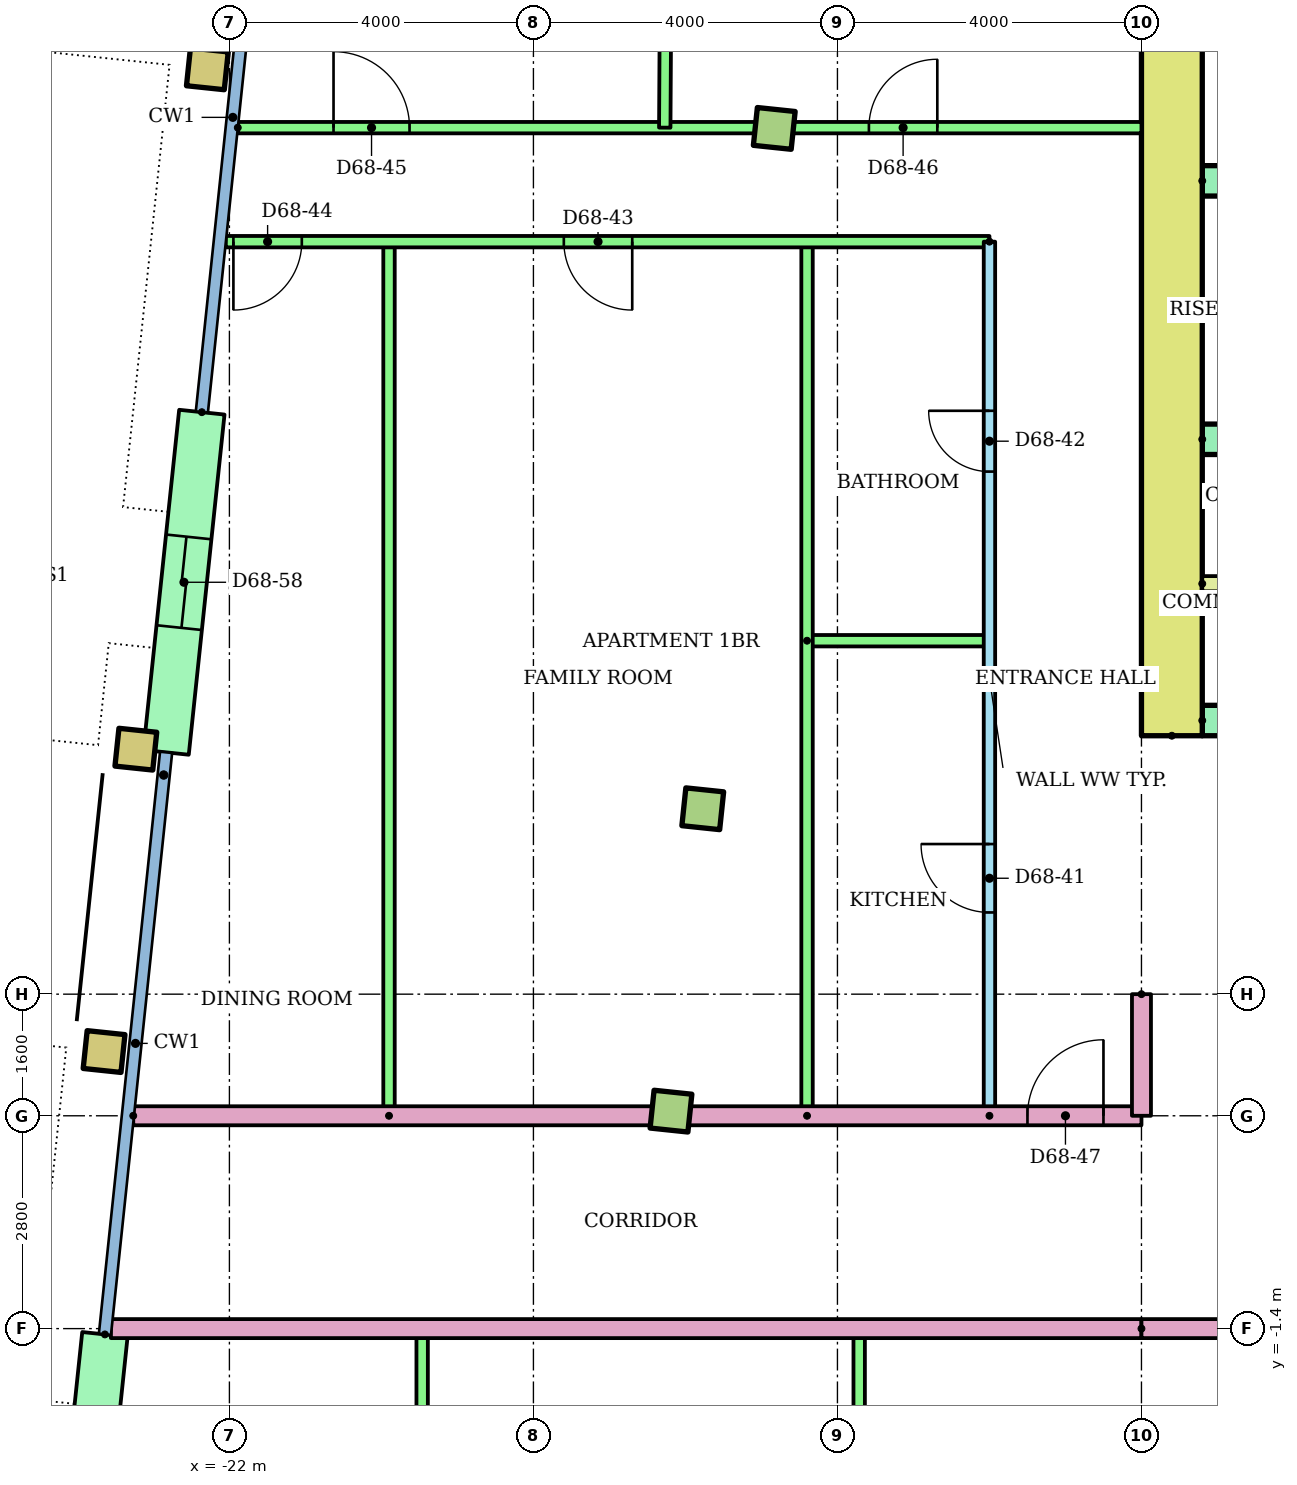
"""IFC4 building model, lengths in metres.
Left out: names, types, materials, properties, quantities, classifications, styles, units other than length and angle.
Written with IfcOpenShell. Run it as: python <this file> out.ifc"""

import sys

from ifc_helpers import new_model, si_unit, direction, frame, frame_2d, origin, origin_2d, place, context, subcontext, project, spatial, rectangle, hollow_rectangle, extrude, element, fill, save


model = new_model("IFC4")
c1 = context("Model", 3, precision=1e-05, world=origin(), true_north=direction((0.0, 1.0)))
c2 = subcontext(c1, "Body", "Model", "MODEL_VIEW")
j1 = project(units=[si_unit("LENGTHUNIT", "METRE"), si_unit("PLANEANGLEUNIT", "RADIAN")], contexts=[c1])
p1 = place(None, origin())
s1 = spatial("IfcSite", under=j1, at=p1, CompositionType="ELEMENT")
p2 = place(p1, origin())
s2 = spatial("IfcBuilding", under=s1, at=p2, CompositionType="ELEMENT")
p3 = place(p2, frame((0.0, 0.0, 262.7)))
s3 = spatial("IfcBuildingStorey", under=s2, at=p3, CompositionType="ELEMENT", Elevation=262.7)
p4 = place(p3, frame((-23.649, 2.245, 0.0), z_axis=(0.0, 0.0, 1.0), x_axis=(0.994521895368, -0.104528463268, 0.0)))
e1 = element("IfcColumn", 1, at=p4, inside=s3, PredefinedType="COLUMN", context=c2, shape_type="SweptSolid", body=[
    extrude(hollow_rectangle(XDim=0.5, YDim=0.5, WallThickness=0.025, at=origin_2d()), origin(), (0.0, 0.0, 1.0), 3.2),
])
p5 = place(p3, frame((-16.19, 1.461, 0.0), z_axis=(0.0, 0.0, 1.0), x_axis=(0.994521895368, -0.104528463268, 0.0)))
e2 = element("IfcColumn", 2, at=p5, inside=s3, PredefinedType="COLUMN", context=c2, shape_type="SweptSolid", body=[
    extrude(rectangle(XDim=0.5, YDim=0.5, at=origin_2d()), origin(), (0.0, 0.0, 1.0), 3.2),
])
p6 = place(p3, frame((-23.231, 6.223, 0.0), z_axis=(0.0, 0.0, 1.0), x_axis=(0.994521895368, -0.104528463268, 0.0)))
e3 = element("IfcColumn", 3, at=p6, inside=s3, PredefinedType="COLUMN", context=c2, shape_type="SweptSolid", body=[
    extrude(hollow_rectangle(XDim=0.5, YDim=0.5, WallThickness=0.025, at=origin_2d()), origin(), (0.0, 0.0, 1.0), 3.2),
])
p7 = place(p3, frame((-15.772, 5.439, 0.0), z_axis=(0.0, 0.0, 1.0), x_axis=(0.994521895368, -0.104528463268, 0.0)))
e4 = element("IfcColumn", 4, at=p7, inside=s3, PredefinedType="COLUMN", context=c2, shape_type="SweptSolid", body=[
    extrude(rectangle(XDim=0.5, YDim=0.5, at=origin_2d()), origin(), (0.0, 0.0, 1.0), 3.2),
])
p8 = place(p3, frame((-22.29, 15.174, 0.0), z_axis=(0.0, 0.0, 1.0), x_axis=(0.994521895368, -0.104528463268, 0.0)))
e5 = element("IfcColumn", 5, at=p8, inside=s3, PredefinedType="COLUMN", context=c2, shape_type="SweptSolid", body=[
    extrude(hollow_rectangle(XDim=0.5, YDim=0.5, WallThickness=0.025, at=origin_2d()), origin(), (0.0, 0.0, 1.0), 3.2),
])
p9 = place(p3, frame((-14.831, 14.39, 0.0), z_axis=(0.0, 0.0, 1.0), x_axis=(0.994521895368, -0.104528463268, 0.0)))
e6 = element("IfcColumn", 6, at=p9, inside=s3, PredefinedType="COLUMN", context=c2, shape_type="SweptSolid", body=[
    extrude(rectangle(XDim=0.5, YDim=0.5, at=origin_2d()), origin(), (0.0, 0.0, 1.0), 3.2),
])
p10 = place(p3, frame((-22.363, 10.657, 0.0), z_axis=(0.0, 0.0, 1.0), x_axis=(-0.104492739125, -0.994525649478, 0.0)))
e7 = element("IfcWall", 7, at=p10, inside=s3, PredefinedType="STANDARD", context=c2, shape_type="SweptSolid", body=[
    extrude(rectangle(XDim=4.5, YDim=0.6, at=frame_2d((2.25, 0.0))), origin(), (0.0, 0.0, 1.0), 2.92),
])
p11 = place(p10, frame((1.65, 0.0, 0.0)))
e8 = element("IfcOpeningElement", 8, at=p11, cuts=e7, PredefinedType="OPENING", context=c2, shape_type="SweptSolid", body=[
    extrude(rectangle(XDim=1.2, YDim=2.1, at=frame_2d((0.6, 1.05))), frame((0.0, 0.31, 0.0), z_axis=(0.0, -1.0, 0.0), x_axis=(1.0, 0.0, 0.0)), (0.0, 0.0, 1.0), 0.62),
])
p12 = place(p3, frame((-23.638, -1.476, 0.0), z_axis=(0.0, 0.0, 1.0), x_axis=(-0.104513052986, -0.994523514933, 0.0)))
e9 = element("IfcWall", 9, at=p12, inside=s3, PredefinedType="STANDARD", context=c2, shape_type="SweptSolid", body=[
    extrude(rectangle(XDim=3.7, YDim=0.6, at=frame_2d((1.85, 0.0))), origin(), (0.0, 0.0, 1.0), 2.92),
])
p13 = place(p12, frame((1.25, 0.0, 0.0)))
e10 = element("IfcOpeningElement", 10, at=p13, cuts=e9, PredefinedType="OPENING", context=c2, shape_type="SweptSolid", body=[
    extrude(rectangle(XDim=1.2, YDim=2.1, at=frame_2d((0.6, 1.05))), frame((0.0, 0.31, 0.0), z_axis=(0.0, -1.0, 0.0), x_axis=(1.0, 0.0, 0.0)), (0.0, 0.0, 1.0), 0.62),
])
p14 = place(p3, frame((-9.6, 6.4, 0.0), z_axis=(0.0, 0.0, 1.0), x_axis=(0.0, 1.0, 0.0)))
e11 = element("IfcWall", 11, at=p14, inside=s3, PredefinedType="SHEAR", context=c2, shape_type="SweptSolid", body=[
    extrude(rectangle(XDim=13.6, YDim=0.8, at=frame_2d((6.8, 0.0))), origin(), (0.0, 0.0, 1.0), 2.92),
])
p15 = place(p3, frame((-9.2, 6.6, 0.0)))
e12 = element("IfcWall", 12, at=p15, inside=s3, PredefinedType="SHEAR", context=c2, shape_type="SweptSolid", body=[
    extrude(rectangle(XDim=18.4, YDim=0.4, at=frame_2d((9.2, 0.0))), origin(), (0.0, 0.0, 1.0), 2.92),
])
p16 = place(p15, frame((8.3, 0.0, 0.0)))
e13 = element("IfcOpeningElement", 13, at=p16, cuts=e12, PredefinedType="OPENING", context=c2, shape_type="SweptSolid", body=[
    extrude(rectangle(XDim=1.8, YDim=2.1, at=frame_2d((0.9, 1.05))), frame((0.0, 0.21, 0.0), z_axis=(0.0, -1.0, 0.0), x_axis=(1.0, 0.0, 0.0)), (0.0, 0.0, 1.0), 0.42),
])
p17 = place(p15, frame((3.8, 0.0, 0.0)))
e14 = element("IfcOpeningElement", 14, at=p17, cuts=e12, PredefinedType="OPENING", context=c2, shape_type="SweptSolid", body=[
    extrude(rectangle(XDim=1.8, YDim=2.1, at=frame_2d((0.9, 1.05))), frame((0.0, 0.21, 0.0), z_axis=(0.0, -1.0, 0.0), x_axis=(1.0, 0.0, 0.0)), (0.0, 0.0, 1.0), 0.42),
])
p18 = place(p15, frame((12.8, 0.0, 0.0)))
e15 = element("IfcOpeningElement", 15, at=p18, cuts=e12, PredefinedType="OPENING", context=c2, shape_type="SweptSolid", body=[
    extrude(rectangle(XDim=1.8, YDim=2.1, at=frame_2d((0.9, 1.05))), frame((0.0, 0.21, 0.0), z_axis=(0.0, -1.0, 0.0), x_axis=(1.0, 0.0, 0.0)), (0.0, 0.0, 1.0), 0.42),
])
p19 = place(p3, frame((-9.2, 10.3, 0.0)))
e16 = element("IfcWall", 16, at=p19, inside=s3, PredefinedType="SHEAR", context=c2, shape_type="SweptSolid", body=[
    extrude(rectangle(XDim=8.0, YDim=0.4, at=frame_2d((4.0, 0.0))), origin(), (0.0, 0.0, 1.0), 2.92),
])
p20 = place(p19, frame((3.35, 0.0, 0.0)))
e17 = element("IfcOpeningElement", 17, at=p20, cuts=e16, PredefinedType="OPENING", context=c2, shape_type="SweptSolid", body=[
    extrude(rectangle(XDim=1.1, YDim=2.1, at=frame_2d((0.55, 1.05))), frame((0.0, 0.21, 0.0), z_axis=(0.0, -1.0, 0.0), x_axis=(1.0, 0.0, 0.0)), (0.0, 0.0, 1.0), 0.42),
])
p21 = place(p19, frame((6.083, 0.0, 0.0)))
e18 = element("IfcOpeningElement", 18, at=p21, cuts=e16, PredefinedType="OPENING", context=c2, shape_type="SweptSolid", body=[
    extrude(rectangle(XDim=1.1, YDim=2.1, at=frame_2d((0.55, 1.05))), frame((0.0, 0.21, 0.0), z_axis=(0.0, -1.0, 0.0), x_axis=(1.0, 0.0, 0.0)), (0.0, 0.0, 1.0), 0.42),
])
p22 = place(p19, frame((0.917, 0.0, 0.0)))
e19 = element("IfcOpeningElement", 19, at=p22, cuts=e16, PredefinedType="OPENING", context=c2, shape_type="SweptSolid", body=[
    extrude(rectangle(XDim=1.0, YDim=2.1, at=frame_2d((0.5, 1.05))), frame((0.0, 0.21, 0.0), z_axis=(0.0, -1.0, 0.0), x_axis=(1.0, 0.0, 0.0)), (0.0, 0.0, 1.0), 0.42),
])
p23 = place(p3, frame((-9.2, 13.7, 0.0)))
e20 = element("IfcWall", 20, at=p23, inside=s3, PredefinedType="SHEAR", context=c2, shape_type="SweptSolid", body=[
    extrude(rectangle(XDim=8.0, YDim=0.4, at=frame_2d((4.0, 0.0))), origin(), (0.0, 0.0, 1.0), 2.92),
])
p24 = place(p3, frame((-9.2, 8.4, 0.0)))
e21 = element("IfcWall", 21, at=p24, inside=s3, PredefinedType="PARTITIONING", context=c2, shape_type="SweptSolid", body=[
    extrude(rectangle(XDim=3.4, YDim=0.2, at=frame_2d((1.7, 0.0))), origin(), (0.0, 0.0, 1.0), 2.92),
])
for number, where, z_axis, x_axis in (
    (22, (-13.714, -7.047, 0.0), (0.0, 0.0, 1.0), (0.0, 1.0, 0.0)),
    (23, (-19.464, -7.047, 0.0), (0.0, 0.0, 1.0), (0.0, 1.0, 0.0)),
):
    element("IfcWall", number, at=place(p3, frame(where, z_axis=z_axis, x_axis=x_axis)), inside=s3, PredefinedType="PARTITIONING", context=c2, shape_type="SweptSolid", body=[
        extrude(rectangle(XDim=5.647, YDim=0.15, at=frame_2d((2.823, 0.0))), origin(), (0.0, 0.0, 1.0), 2.4),
    ])
p25 = place(p3, frame((-10.0, -1.4, 0.0), z_axis=(0.0, 0.0, 1.0), x_axis=(-1.0, 0.0, 0.0)))
e24 = element("IfcWall", 24, at=p25, inside=s3, PredefinedType="PARTITIONING", context=c2, shape_type="SweptSolid", body=[
    extrude(rectangle(XDim=13.56, YDim=0.25, at=frame_2d((6.78, 0.0))), origin(), (0.0, 0.0, 1.0), 2.4),
])
p26 = place(p3, frame((-12.0, 1.4, 0.0), z_axis=(0.0, 0.0, 1.0), x_axis=(0.0, 1.0, 0.0)))
e25 = element("IfcWall", 25, at=p26, inside=s3, PredefinedType="PARTITIONING", context=c2, shape_type="SweptSolid", body=[
    extrude(rectangle(XDim=11.5, YDim=0.15, at=frame_2d((5.75, 0.0))), origin(), (0.0, 0.0, 1.0), 2.4),
])
p27 = place(p26, frame((2.675, 0.0, 0.0)))
e26 = element("IfcOpeningElement", 26, at=p27, cuts=e25, PredefinedType="OPENING", context=c2, shape_type="SweptSolid", body=[
    extrude(rectangle(XDim=0.9, YDim=2.1, at=frame_2d((0.45, 1.05))), frame((0.0, 0.085, 0.0), z_axis=(0.0, -1.0, 0.0), x_axis=(1.0, 0.0, 0.0)), (0.0, 0.0, 1.0), 0.17),
])
p28 = place(p26, frame((8.475, 0.0, 0.0)))
e27 = element("IfcOpeningElement", 27, at=p28, cuts=e25, PredefinedType="OPENING", context=c2, shape_type="SweptSolid", body=[
    extrude(rectangle(XDim=0.8, YDim=2.1, at=frame_2d((0.4, 1.05))), frame((0.0, 0.085, 0.0), z_axis=(0.0, -1.0, 0.0), x_axis=(1.0, 0.0, 0.0)), (0.0, 0.0, 1.0), 0.17),
])
p29 = place(p3, frame((-14.4, 7.65, 0.0)))
e28 = element("IfcWall", 28, at=p29, inside=s3, PredefinedType="PARTITIONING", context=c2, shape_type="SweptSolid", body=[
    extrude(rectangle(XDim=2.4, YDim=0.15, at=frame_2d((1.2, 0.0))), origin(), (0.0, 0.0, 1.0), 2.4),
])
for number, where, z_axis, x_axis in (
    (29, (-14.4, 1.4, 0.0), (0.0, 0.0, 1.0), (0.0, 1.0, 0.0)),
    (30, (-19.9, 1.4, 0.0), (0.0, 0.0, 1.0), (0.0, 1.0, 0.0)),
):
    element("IfcWall", number, at=place(p3, frame(where, z_axis=z_axis, x_axis=x_axis)), inside=s3, PredefinedType="PARTITIONING", context=c2, shape_type="SweptSolid", body=[
        extrude(rectangle(XDim=11.5, YDim=0.15, at=frame_2d((5.75, 0.0))), origin(), (0.0, 0.0, 1.0), 2.4),
    ])
p30 = place(p3, frame((-12.0, 12.9, 0.0), z_axis=(0.0, 0.0, 1.0), x_axis=(-1.0, 0.0, 0.0)))
e31 = element("IfcWall", 31, at=p30, inside=s3, PredefinedType="PARTITIONING", context=c2, shape_type="SweptSolid", body=[
    extrude(rectangle(XDim=10.047, YDim=0.15, at=frame_2d((5.024, 0.0))), origin(), (0.0, 0.0, 1.0), 2.4),
])
p31 = place(p30, frame((4.7, 0.0, 0.0)))
e32 = element("IfcOpeningElement", 32, at=p31, cuts=e31, PredefinedType="OPENING", context=c2, shape_type="SweptSolid", body=[
    extrude(rectangle(XDim=0.9, YDim=2.1, at=frame_2d((0.45, 1.05))), frame((0.0, 0.085, 0.0), z_axis=(0.0, -1.0, 0.0), x_axis=(1.0, 0.0, 0.0)), (0.0, 0.0, 1.0), 0.17),
])
p32 = place(p30, frame((9.047, 0.0, 0.0)))
e33 = element("IfcOpeningElement", 33, at=p32, cuts=e31, PredefinedType="OPENING", context=c2, shape_type="SweptSolid", body=[
    extrude(rectangle(XDim=0.9, YDim=2.1, at=frame_2d((0.45, 1.05))), frame((0.0, 0.085, 0.0), z_axis=(0.0, -1.0, 0.0), x_axis=(1.0, 0.0, 0.0)), (0.0, 0.0, 1.0), 0.17),
])
p33 = place(p3, frame((-21.89, 14.4, 0.0)))
e34 = element("IfcWall", 34, at=p33, inside=s3, PredefinedType="PARTITIONING", context=c2, shape_type="SweptSolid", body=[
    extrude(rectangle(XDim=11.89, YDim=0.15, at=frame_2d((5.945, 0.0))), origin(), (0.0, 0.0, 1.0), 2.4),
])
p34 = place(p33, frame((1.26, 0.0, 0.0)))
e35 = element("IfcOpeningElement", 35, at=p34, cuts=e34, PredefinedType="OPENING", context=c2, shape_type="SweptSolid", body=[
    extrude(rectangle(XDim=1.0, YDim=2.1, at=frame_2d((0.5, 1.05))), frame((0.0, 0.085, 0.0), z_axis=(0.0, -1.0, 0.0), x_axis=(1.0, 0.0, 0.0)), (0.0, 0.0, 1.0), 0.17),
])
p35 = place(p33, frame((8.304, 0.0, 0.0)))
e36 = element("IfcOpeningElement", 36, at=p35, cuts=e34, PredefinedType="OPENING", context=c2, shape_type="SweptSolid", body=[
    extrude(rectangle(XDim=0.9, YDim=2.1, at=frame_2d((0.45, 1.05))), frame((0.0, 0.085, 0.0), z_axis=(0.0, -1.0, 0.0), x_axis=(1.0, 0.0, 0.0)), (0.0, 0.0, 1.0), 0.17),
])
p36 = place(p3, frame((-16.222, 22.61, 0.0), z_axis=(0.0, 0.0, 1.0), x_axis=(-0.006095634594, -0.999981421447, 0.0)))
e37 = element("IfcWall", 37, at=p36, inside=s3, PredefinedType="PARTITIONING", context=c2, shape_type="SweptSolid", body=[
    extrude(rectangle(XDim=8.211, YDim=0.15, at=frame_2d((4.105, 0.0))), origin(), (0.0, 0.0, 1.0), 2.4),
])
p37 = place(p3, frame((-23.265, 1.4, 0.0)))
e38 = element("IfcWall", 38, at=p37, inside=s3, PredefinedType="PARTITIONING", context=c2, shape_type="SweptSolid", body=[
    extrude(rectangle(XDim=13.265, YDim=0.25, at=frame_2d((6.633, 0.0))), origin(), (0.0, 0.0, 1.0), 2.4),
])
p38 = place(p37, frame((11.765, 0.0, 0.0)))
e39 = element("IfcOpeningElement", 39, at=p38, cuts=e38, PredefinedType="OPENING", context=c2, shape_type="SweptSolid", body=[
    extrude(rectangle(XDim=1.0, YDim=2.1, at=frame_2d((0.5, 1.05))), frame((0.0, 0.135, 0.0), z_axis=(0.0, -1.0, 0.0), x_axis=(1.0, 0.0, 0.0)), (0.0, 0.0, 1.0), 0.27),
])
p39 = place(p3, frame((10.0, -1.4, 0.0), z_axis=(0.0, 0.0, 1.0), x_axis=(-1.0, 0.0, 0.0)))
e40 = element("IfcWall", 40, at=p39, inside=s3, PredefinedType="PARTITIONING", context=c2, shape_type="SweptSolid", body=[
    extrude(rectangle(XDim=20.0, YDim=0.25, at=frame_2d((10.0, 0.0))), origin(), (0.0, 0.0, 1.0), 2.4),
])
p40 = place(p39, frame((12.314, 0.0, 0.0)))
e41 = element("IfcOpeningElement", 41, at=p40, cuts=e40, PredefinedType="OPENING", context=c2, shape_type="SweptSolid", body=[
    extrude(rectangle(XDim=1.0, YDim=2.1, at=frame_2d((0.5, 1.05))), frame((0.0, 0.135, 0.0), z_axis=(0.0, -1.0, 0.0), x_axis=(1.0, 0.0, 0.0)), (0.0, 0.0, 1.0), 0.27),
])
p41 = place(p39, frame((10.57, 0.0, 0.0)))
e42 = element("IfcOpeningElement", 42, at=p41, cuts=e40, PredefinedType="OPENING", context=c2, shape_type="SweptSolid", body=[
    extrude(rectangle(XDim=0.9, YDim=2.1, at=frame_2d((0.45, 1.05))), frame((0.0, 0.135, 0.0), z_axis=(0.0, -1.0, 0.0), x_axis=(1.0, 0.0, 0.0)), (0.0, 0.0, 1.0), 0.27),
])
p42 = place(p3, frame((-10.0, 3.0, 0.0), z_axis=(0.0, 0.0, 1.0), x_axis=(0.0, -1.0, 0.0)))
e43 = element("IfcWall", 43, at=p42, inside=s3, PredefinedType="PARTITIONING", context=c2, shape_type="SweptSolid", body=[
    extrude(rectangle(XDim=1.6, YDim=0.25, at=frame_2d((0.8, 0.0))), origin(), (0.0, 0.0, 1.0), 2.4),
])
p43 = place(p27, origin())
e44 = element("IfcDoor", 44, at=p43, inside=s3, OperationType="SINGLE_SWING_RIGHT", PredefinedType="DOOR", context=c2, shape_type="SweptSolid", body=[
    extrude(rectangle(XDim=0.9, YDim=2.1, at=frame_2d((0.45, 1.05))), frame((0.0, 0.025, 0.0), z_axis=(0.0, -1.0, 0.0), x_axis=(1.0, 0.0, 0.0)), (0.0, 0.0, 1.0), 0.05),
])
fill(e26, e44)
p44 = place(p28, origin())
e45 = element("IfcDoor", 45, at=p44, inside=s3, OperationType="SINGLE_SWING_RIGHT", PredefinedType="DOOR", context=c2, shape_type="SweptSolid", body=[
    extrude(rectangle(XDim=0.8, YDim=2.1, at=frame_2d((0.4, 1.05))), frame((0.0, 0.025, 0.0), z_axis=(0.0, -1.0, 0.0), x_axis=(1.0, 0.0, 0.0)), (0.0, 0.0, 1.0), 0.05),
])
fill(e27, e45)
p45 = place(p31, origin())
e46 = element("IfcDoor", 46, at=p45, inside=s3, OperationType="SINGLE_SWING_LEFT", PredefinedType="DOOR", context=c2, shape_type="SweptSolid", body=[
    extrude(rectangle(XDim=0.9, YDim=2.1, at=frame_2d((0.45, 1.05))), frame((0.0, 0.025, 0.0), z_axis=(0.0, -1.0, 0.0), x_axis=(1.0, 0.0, 0.0)), (0.0, 0.0, 1.0), 0.05),
])
fill(e32, e46)
p46 = place(p32, origin())
e47 = element("IfcDoor", 47, at=p46, inside=s3, OperationType="SINGLE_SWING_RIGHT", PredefinedType="DOOR", context=c2, shape_type="SweptSolid", body=[
    extrude(rectangle(XDim=0.9, YDim=2.1, at=frame_2d((0.45, 1.05))), frame((0.0, 0.025, 0.0), z_axis=(0.0, -1.0, 0.0), x_axis=(1.0, 0.0, 0.0)), (0.0, 0.0, 1.0), 0.05),
])
fill(e33, e47)
p47 = place(p34, origin())
e48 = element("IfcDoor", 48, at=p47, inside=s3, OperationType="SINGLE_SWING_LEFT", PredefinedType="DOOR", context=c2, shape_type="SweptSolid", body=[
    extrude(rectangle(XDim=1.0, YDim=2.1, at=frame_2d((0.5, 1.05))), frame((0.0, 0.025, 0.0), z_axis=(0.0, -1.0, 0.0), x_axis=(1.0, 0.0, 0.0)), (0.0, 0.0, 1.0), 0.05),
])
fill(e35, e48)
p48 = place(p35, origin())
e49 = element("IfcDoor", 49, at=p48, inside=s3, OperationType="SINGLE_SWING_RIGHT", PredefinedType="DOOR", context=c2, shape_type="SweptSolid", body=[
    extrude(rectangle(XDim=0.9, YDim=2.1, at=frame_2d((0.45, 1.05))), frame((0.0, 0.025, 0.0), z_axis=(0.0, -1.0, 0.0), x_axis=(1.0, 0.0, 0.0)), (0.0, 0.0, 1.0), 0.05),
])
fill(e36, e49)
p49 = place(p38, origin())
e50 = element("IfcDoor", 50, at=p49, inside=s3, OperationType="SINGLE_SWING_RIGHT", PredefinedType="DOOR", context=c2, shape_type="SweptSolid", body=[
    extrude(rectangle(XDim=1.0, YDim=2.1, at=frame_2d((0.5, 1.05))), frame((0.0, 0.025, 0.0), z_axis=(0.0, -1.0, 0.0), x_axis=(1.0, 0.0, 0.0)), (0.0, 0.0, 1.0), 0.05),
])
fill(e39, e50)
p50 = place(p11, origin())
e51 = element("IfcDoor", 51, at=p50, inside=s3, OperationType="SLIDING_TO_LEFT", PredefinedType="DOOR", context=c2, shape_type="SweptSolid", body=[
    extrude(rectangle(XDim=1.2, YDim=2.1, at=frame_2d((0.6, 1.05))), frame((0.0, 0.025, 0.0), z_axis=(0.0, -1.0, 0.0), x_axis=(1.0, 0.0, 0.0)), (0.0, 0.0, 1.0), 0.05),
])
fill(e8, e51)
save(model, sys.argv[1])
